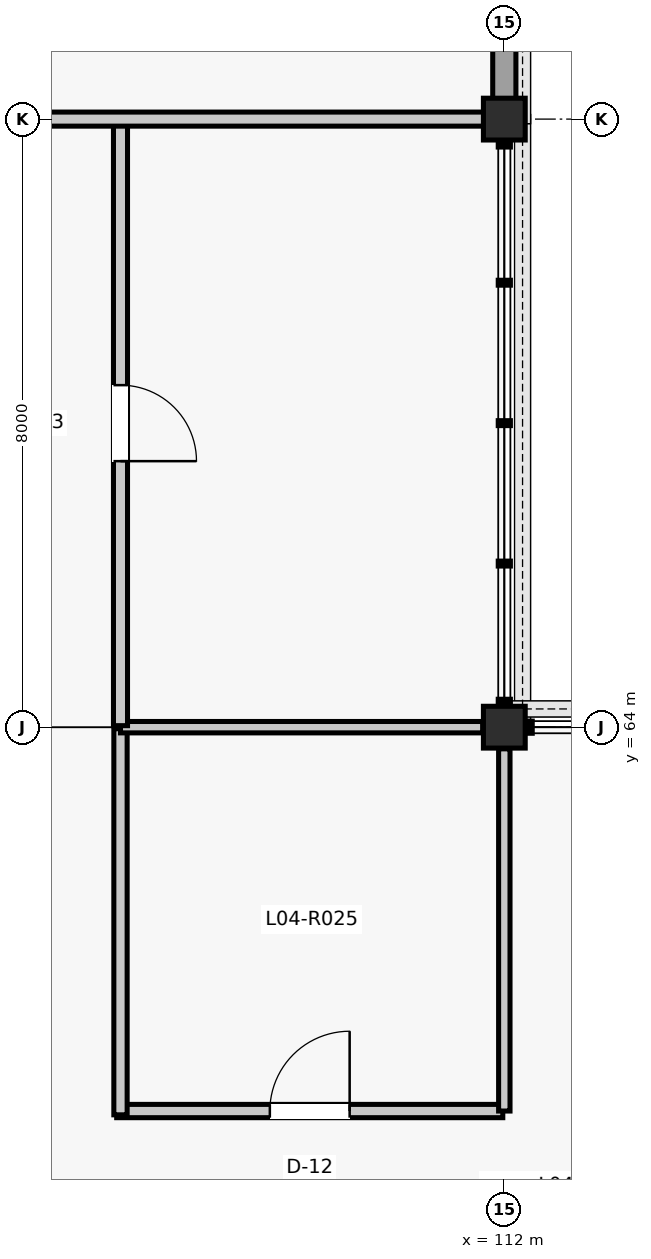
"""IFC4 building model, lengths in metres.
Left out: names, types, materials, properties, quantities, classifications, styles, units other than length and angle.
Written with IfcOpenShell. Run it as: python <this file> out.ifc"""

import sys

from ifc_helpers import new_model, si_unit, direction, frame, frame_2d, origin, origin_2d, place, context, subcontext, project, spatial, rectangle, extrude, element, fill, save


model = new_model("IFC4")
c1 = context("Model", 3, precision=1e-05, world=origin(), true_north=direction((0.0, 1.0)))
c2 = subcontext(c1, "Body", "Model", "MODEL_VIEW")
j1 = project(units=[si_unit("LENGTHUNIT", "METRE"), si_unit("PLANEANGLEUNIT", "RADIAN")], contexts=[c1])
p1 = place(None, origin())
s1 = spatial("IfcSite", under=j1, at=p1, CompositionType="ELEMENT")
p2 = place(p1, origin())
s2 = spatial("IfcBuilding", under=s1, at=p2, CompositionType="ELEMENT")
p3 = place(p2, frame((0.0, 0.0, 17.82)))
s3 = spatial("IfcBuildingStorey", under=s2, at=p3, CompositionType="ELEMENT", Elevation=17.82)
for number, where, z_axis, x_axis in (
    (1, (112.0, 64.0, 0.0), (0.0, 0.0, 1.0), (1.0, 0.0, 0.0)),
    (2, (112.0, 72.0, 0.0), (0.0, 0.0, 1.0), (1.0, 0.0, 0.0)),
):
    element("IfcColumn", number, at=place(p3, frame(where, z_axis=z_axis, x_axis=x_axis)), inside=s3, PredefinedType="COLUMN", context=c2, shape_type="SweptSolid", body=[
        extrude(rectangle(XDim=0.55, YDim=0.55, at=origin_2d()), origin(), (0.0, 0.0, 1.0), 3.96),
    ])
p4 = place(p3, frame((112.0, 72.26, 0.0), z_axis=(0.0, 0.0, 1.0), x_axis=(0.0, 1.0, 0.0)))
e3 = element("IfcWall", 3, at=p4, inside=s3, PredefinedType="SOLIDWALL", context=c2, shape_type="SweptSolid", body=[
    extrude(rectangle(XDim=7.48, YDim=0.305, at=frame_2d((3.74, 0.0))), origin(), (0.0, 0.0, 1.0), 3.352),
])
p5 = place(p4, frame((2.915, 0.0, 0.9)))
e4 = element("IfcOpeningElement", 4, at=p5, cuts=e3, PredefinedType="OPENING", context=c2, shape_type="SweptSolid", body=[
    extrude(rectangle(XDim=1.65, YDim=1.75, at=frame_2d((0.825, 0.875))), frame((0.0, 0.162, 0.0), z_axis=(0.0, -1.0, 0.0), x_axis=(1.0, 0.0, 0.0)), (0.0, 0.0, 1.0), 0.325),
])
p6 = place(p3, frame((106.9, 58.95, 0.0), z_axis=(0.0, 0.0, 1.0), x_axis=(1.0, 0.0, 0.0)))
e5 = element("IfcWall", 5, at=p6, inside=s3, PredefinedType="PARTITIONING", context=c2, shape_type="SweptSolid", body=[
    extrude(rectangle(XDim=5.08, YDim=0.175, at=frame_2d((2.54, 0.0))), origin(), (0.0, 0.0, 1.0), 3.232),
])
p7 = place(p6, frame((2.015, 0.0, 0.0)))
e6 = element("IfcOpeningElement", 6, at=p7, cuts=e5, PredefinedType="OPENING", context=c2, shape_type="SweptSolid", body=[
    extrude(rectangle(XDim=1.05, YDim=2.15, at=frame_2d((0.525, 1.075))), frame((0.0, 0.097, 0.0), z_axis=(0.0, -1.0, 0.0), x_axis=(1.0, 0.0, 0.0)), (0.0, 0.0, 1.0), 0.195),
])
p8 = place(p3, frame((106.95, 58.9, 0.0), z_axis=(0.0, 0.0, 1.0), x_axis=(0.0, 1.0, 0.0)))
e7 = element("IfcWall", 7, at=p8, inside=s3, PredefinedType="PARTITIONING", context=c2, shape_type="SweptSolid", body=[
    extrude(rectangle(XDim=5.08, YDim=0.175, at=frame_2d((2.54, 0.0))), origin(), (0.0, 0.0, 1.0), 3.238),
])
p9 = place(p3, frame((106.95, 64.0, 0.0), z_axis=(0.0, 0.0, 1.0), x_axis=(1.0, 0.0, 0.0)))
e8 = element("IfcWall", 8, at=p9, inside=s3, PredefinedType="PARTITIONING", context=c2, shape_type="SweptSolid", body=[
    extrude(rectangle(XDim=4.765, YDim=0.15, at=frame_2d((2.383, 0.0))), origin(), (0.0, 0.0, 1.0), 3.238),
])
p10 = place(p3, frame((112.0, 58.95, 0.0), z_axis=(0.0, 0.0, 1.0), x_axis=(0.0, 1.0, 0.0)))
e9 = element("IfcWall", 9, at=p10, inside=s3, PredefinedType="PARTITIONING", context=c2, shape_type="SweptSolid", body=[
    extrude(rectangle(XDim=4.765, YDim=0.15, at=frame_2d((2.383, 0.0))), origin(), (0.0, 0.0, 1.0), 3.232),
])
p11 = place(p3, frame((106.95, 64.02, 0.0), z_axis=(0.0, 0.0, 1.0), x_axis=(0.0, 1.0, 0.0)))
e10 = element("IfcWall", 10, at=p11, inside=s3, PredefinedType="PARTITIONING", context=c2, shape_type="SweptSolid", body=[
    extrude(rectangle(XDim=7.96, YDim=0.185, at=frame_2d((3.98, 0.0))), origin(), (0.0, 0.0, 1.0), 3.226),
])
p12 = place(p11, frame((3.48, 0.0, 0.0)))
e11 = element("IfcOpeningElement", 11, at=p12, cuts=e10, PredefinedType="OPENING", context=c2, shape_type="SweptSolid", body=[
    extrude(rectangle(XDim=1.0, YDim=2.15, at=frame_2d((0.5, 1.075))), frame((0.0, 0.103, 0.0), z_axis=(0.0, -1.0, 0.0), x_axis=(1.0, 0.0, 0.0)), (0.0, 0.0, 1.0), 0.205),
])
p13 = place(p3, frame((104.39, 72.0, 0.0), z_axis=(0.0, 0.0, 1.0), x_axis=(1.0, 0.0, 0.0)))
e12 = element("IfcWall", 12, at=p13, inside=s3, PredefinedType="PARTITIONING", context=c2, shape_type="SweptSolid", body=[
    extrude(rectangle(XDim=7.345, YDim=0.185, at=frame_2d((3.673, 0.0))), origin(), (0.0, 0.0, 1.0), 3.226),
])
p14 = place(p13, frame((0.52, 0.0, 0.0)))
e13 = element("IfcOpeningElement", 13, at=p14, cuts=e12, PredefinedType="OPENING", context=c2, shape_type="SweptSolid", body=[
    extrude(rectangle(XDim=0.94, YDim=2.12, at=frame_2d((0.47, 1.06))), frame((0.0, 0.103, 0.0), z_axis=(0.0, -1.0, 0.0), x_axis=(1.0, 0.0, 0.0)), (0.0, 0.0, 1.0), 0.205),
])
p15 = place(p7, origin())
e14 = element("IfcDoor", 14, at=p15, inside=s3, OperationType="SINGLE_SWING_RIGHT", PredefinedType="DOOR", context=c2, shape_type="SweptSolid", body=[
    extrude(rectangle(XDim=1.05, YDim=2.15, at=frame_2d((0.525, 1.075))), frame((0.0, 0.025, 0.0), z_axis=(0.0, -1.0, 0.0), x_axis=(1.0, 0.0, 0.0)), (0.0, 0.0, 1.0), 0.05),
])
fill(e6, e14)
p16 = place(p12, frame((1.0, 0.0, 0.0), z_axis=(0.0, 0.0, 1.0), x_axis=(-1.0, 0.0, 0.0)))
e15 = element("IfcDoor", 15, at=p16, inside=s3, OperationType="SINGLE_SWING_LEFT", PredefinedType="DOOR", context=c2, shape_type="SweptSolid", body=[
    extrude(rectangle(XDim=1.0, YDim=2.15, at=frame_2d((0.5, 1.075))), frame((0.0, 0.025, 0.0), z_axis=(0.0, -1.0, 0.0), x_axis=(1.0, 0.0, 0.0)), (0.0, 0.0, 1.0), 0.05),
])
fill(e11, e15)
save(model, sys.argv[1])
